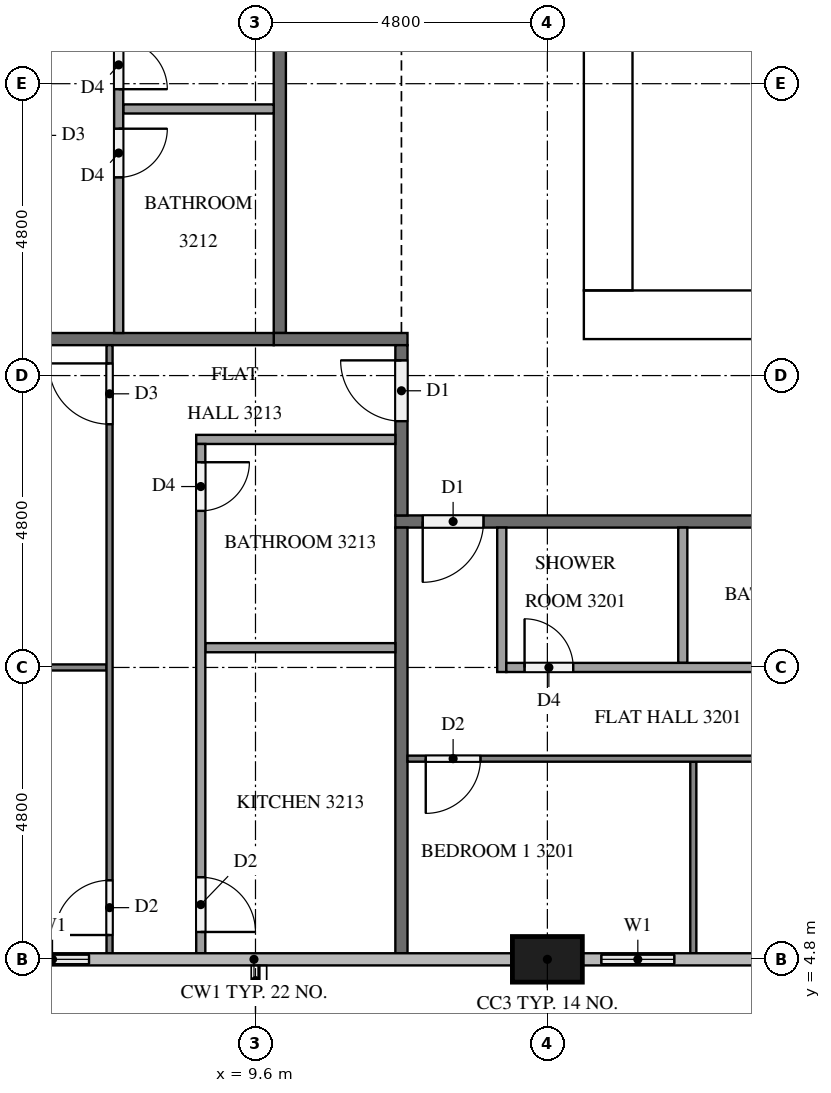
"""IFC4 building model, lengths in metres.
Left out: names, types, materials, properties, quantities, classifications, styles, units other than length and angle.
Written with IfcOpenShell. Run it as: python <this file> out.ifc"""

import sys

from ifc_helpers import new_model, si_unit, direction, frame, frame_2d, origin, origin_2d, place, context, subcontext, project, spatial, rectangle, extrude, element, fill, save


model = new_model("IFC4")
c1 = context("Model", 3, precision=1e-05, world=origin(), true_north=direction((0.0, 1.0)))
c2 = subcontext(c1, "Body", "Model", "MODEL_VIEW")
j1 = project(units=[si_unit("LENGTHUNIT", "METRE"), si_unit("PLANEANGLEUNIT", "RADIAN")], contexts=[c1])
p1 = place(None, origin())
s1 = spatial("IfcSite", under=j1, at=p1, CompositionType="ELEMENT")
p2 = place(p1, origin())
s2 = spatial("IfcBuilding", under=s1, at=p2, CompositionType="ELEMENT")
p3 = place(p2, frame((0.0, 0.0, 126.1)))
s3 = spatial("IfcBuildingStorey", under=s2, at=p3, CompositionType="ELEMENT", Elevation=126.1)
p4 = place(p3, frame((15.0, 15.4, 0.0), z_axis=(0.0, 0.0, 1.0), x_axis=(1.0, 0.0, 0.0)))
e1 = element("IfcWall", 1, at=p4, inside=s3, PredefinedType="SHEAR", context=c2, shape_type="SweptSolid", body=[
    extrude(rectangle(XDim=32.4, YDim=0.8, at=frame_2d((16.2, 0.0))), origin(), (0.0, 0.0, 1.0), 3.2),
])
p5 = place(p4, frame((15.3, 0.0, 0.0)))
e2 = element("IfcOpeningElement", 2, at=p5, cuts=e1, PredefinedType="OPENING", context=c2, shape_type="SweptSolid", body=[
    extrude(rectangle(XDim=1.8, YDim=2.1, at=frame_2d((0.9, 1.05))), frame((0.0, 0.41, 0.0), z_axis=(0.0, -1.0, 0.0), x_axis=(1.0, 0.0, 0.0)), (0.0, 0.0, 1.0), 0.82),
])
p6 = place(p3, frame((15.4, 15.8, 0.0), z_axis=(0.0, 0.0, 1.0), x_axis=(0.0, 1.0, 0.0)))
e3 = element("IfcWall", 3, at=p6, inside=s3, PredefinedType="SHEAR", context=c2, shape_type="SweptSolid", body=[
    extrude(rectangle(XDim=21.2, YDim=0.8, at=frame_2d((10.6, 0.0))), origin(), (0.0, 0.0, 1.0), 3.2),
])
p7 = place(p6, frame((4.96, 0.0, 0.0)))
e4 = element("IfcOpeningElement", 4, at=p7, cuts=e3, PredefinedType="OPENING", context=c2, shape_type="SweptSolid", body=[
    extrude(rectangle(XDim=1.2, YDim=2.1, at=frame_2d((0.6, 1.05))), frame((0.0, 0.41, 0.0), z_axis=(0.0, -1.0, 0.0), x_axis=(1.0, 0.0, 0.0)), (0.0, 0.0, 1.0), 0.82),
])
p8 = place(p3, frame((14.4, 4.8, 0.0), z_axis=(0.0, 0.0, 1.0), x_axis=(1.0, 0.0, 0.0)))
e5 = element("IfcColumn", 5, at=p8, inside=s3, PredefinedType="COLUMN", context=c2, shape_type="SweptSolid", body=[
    extrude(rectangle(XDim=1.15, YDim=0.75, at=origin_2d()), origin(), (0.0, 0.0, 1.0), 3.2),
])
p9 = place(p3, frame((5.325, 4.8, 0.0), z_axis=(0.0, 0.0, 1.0), x_axis=(1.0, 0.0, 0.0)))
e6 = element("IfcWall", 6, at=p9, inside=s3, PredefinedType="SOLIDWALL", context=c2, shape_type="SweptSolid", body=[
    extrude(rectangle(XDim=1.875, YDim=0.15, at=frame_2d((0.938, 0.0))), origin(), (0.0, 0.0, 1.0), 3.2),
])
p10 = place(p9, frame((0.337, 0.0, 0.9)))
e7 = element("IfcOpeningElement", 7, at=p10, cuts=e6, PredefinedType="OPENING", context=c2, shape_type="SweptSolid", body=[
    extrude(rectangle(XDim=1.2, YDim=1.4, at=frame_2d((0.6, 0.7))), frame((0.0, 0.085, 0.0), z_axis=(0.0, -1.0, 0.0), x_axis=(1.0, 0.0, 0.0)), (0.0, 0.0, 1.0), 0.17),
])
p11 = place(p3, frame((14.975, 4.8, 0.0), z_axis=(0.0, 0.0, 1.0), x_axis=(1.0, 0.0, 0.0)))
e8 = element("IfcWall", 8, at=p11, inside=s3, PredefinedType="SOLIDWALL", context=c2, shape_type="SweptSolid", body=[
    extrude(rectangle(XDim=1.825, YDim=0.15, at=frame_2d((0.913, 0.0))), origin(), (0.0, 0.0, 1.0), 3.2),
])
p12 = place(p11, frame((0.312, 0.0, 0.9)))
e9 = element("IfcOpeningElement", 9, at=p12, cuts=e8, PredefinedType="OPENING", context=c2, shape_type="SweptSolid", body=[
    extrude(rectangle(XDim=1.2, YDim=1.4, at=frame_2d((0.6, 0.7))), frame((0.0, 0.085, 0.0), z_axis=(0.0, -1.0, 0.0), x_axis=(1.0, 0.0, 0.0)), (0.0, 0.0, 1.0), 0.17),
])
p13 = place(p3, frame((50.5, 12.0, 0.0), z_axis=(0.0, 0.0, 1.0), x_axis=(-1.0, 0.0, 0.0)))
e10 = element("IfcWall", 10, at=p13, inside=s3, PredefinedType="PARTITIONING", context=c2, shape_type="SweptSolid", body=[
    extrude(rectangle(XDim=38.6, YDim=0.2, at=frame_2d((19.3, 0.0))), origin(), (0.0, 0.0, 1.0), 3.2),
])
p14 = place(p13, frame((37.15, 0.0, 0.0)))
e11 = element("IfcOpeningElement", 11, at=p14, cuts=e10, PredefinedType="OPENING", context=c2, shape_type="SweptSolid", body=[
    extrude(rectangle(XDim=1.0, YDim=2.1, at=frame_2d((0.5, 1.05))), frame((0.0, 0.11, 0.0), z_axis=(0.0, -1.0, 0.0), x_axis=(1.0, 0.0, 0.0)), (0.0, 0.0, 1.0), 0.22),
])
p15 = place(p13, frame((7.65, 0.0, 0.0)))
e12 = element("IfcOpeningElement", 12, at=p15, cuts=e10, PredefinedType="OPENING", context=c2, shape_type="SweptSolid", body=[
    extrude(rectangle(XDim=1.0, YDim=2.1, at=frame_2d((0.5, 1.05))), frame((0.0, 0.11, 0.0), z_axis=(0.0, -1.0, 0.0), x_axis=(1.0, 0.0, 0.0)), (0.0, 0.0, 1.0), 0.22),
])
p16 = place(p13, frame((5.95, 0.0, 0.0)))
e13 = element("IfcOpeningElement", 13, at=p16, cuts=e10, PredefinedType="OPENING", context=c2, shape_type="SweptSolid", body=[
    extrude(rectangle(XDim=1.0, YDim=2.1, at=frame_2d((0.5, 1.05))), frame((0.0, 0.11, 0.0), z_axis=(0.0, -1.0, 0.0), x_axis=(1.0, 0.0, 0.0)), (0.0, 0.0, 1.0), 0.22),
])
p17 = place(p3, frame((10.0, 15.1, 0.0), z_axis=(0.0, 0.0, 1.0), x_axis=(0.0, 1.0, 0.0)))
e14 = element("IfcWall", 14, at=p17, inside=s3, PredefinedType="PARTITIONING", context=c2, shape_type="SweptSolid", body=[
    extrude(rectangle(XDim=22.6, YDim=0.2, at=frame_2d((11.3, 0.0))), origin(), (0.0, 0.0, 1.0), 3.2),
])
p18 = place(p17, frame((21.35, 0.0, 0.0)))
e15 = element("IfcOpeningElement", 15, at=p18, cuts=e14, PredefinedType="OPENING", context=c2, shape_type="SweptSolid", body=[
    extrude(rectangle(XDim=1.0, YDim=2.1, at=frame_2d((0.5, 1.05))), frame((0.0, 0.11, 0.0), z_axis=(0.0, -1.0, 0.0), x_axis=(1.0, 0.0, 0.0)), (0.0, 0.0, 1.0), 0.22),
])
p19 = place(p17, frame((12.35, 0.0, 0.0)))
e16 = element("IfcOpeningElement", 16, at=p19, cuts=e14, PredefinedType="OPENING", context=c2, shape_type="SweptSolid", body=[
    extrude(rectangle(XDim=1.0, YDim=2.1, at=frame_2d((0.5, 1.05))), frame((0.0, 0.11, 0.0), z_axis=(0.0, -1.0, 0.0), x_axis=(1.0, 0.0, 0.0)), (0.0, 0.0, 1.0), 0.22),
])
p20 = place(p3, frame((9.9, 15.0, 0.0), z_axis=(0.0, 0.0, 1.0), x_axis=(1.0, 0.0, 0.0)))
e17 = element("IfcWall", 17, at=p20, inside=s3, PredefinedType="PARTITIONING", context=c2, shape_type="SweptSolid", body=[
    extrude(rectangle(XDim=2.2, YDim=0.2, at=frame_2d((1.1, 0.0))), origin(), (0.0, 0.0, 1.0), 3.2),
])
p21 = place(p3, frame((12.0, 12.1, 0.0), z_axis=(0.0, 0.0, 1.0), x_axis=(0.0, 1.0, 0.0)))
e18 = element("IfcWall", 18, at=p21, inside=s3, PredefinedType="PARTITIONING", context=c2, shape_type="SweptSolid", body=[
    extrude(rectangle(XDim=2.8, YDim=0.2, at=frame_2d((1.4, 0.0))), origin(), (0.0, 0.0, 1.0), 3.2),
])
p22 = place(p21, frame((1.55, 0.0, 0.0)))
e19 = element("IfcOpeningElement", 19, at=p22, cuts=e18, PredefinedType="OPENING", context=c2, shape_type="SweptSolid", body=[
    extrude(rectangle(XDim=1.0, YDim=2.1, at=frame_2d((0.5, 1.05))), frame((0.0, 0.11, 0.0), z_axis=(0.0, -1.0, 0.0), x_axis=(1.0, 0.0, 0.0)), (0.0, 0.0, 1.0), 0.22),
])
p23 = place(p3, frame((12.0, 4.9, 0.0), z_axis=(0.0, 0.0, 1.0), x_axis=(0.0, 1.0, 0.0)))
e20 = element("IfcWall", 20, at=p23, inside=s3, PredefinedType="PARTITIONING", context=c2, shape_type="SweptSolid", body=[
    extrude(rectangle(XDim=7.0, YDim=0.2, at=frame_2d((3.5, 0.0))), origin(), (0.0, 0.0, 1.0), 3.2),
])
p24 = place(p3, frame((0.1, 15.0, 0.0), z_axis=(0.0, 0.0, 1.0), x_axis=(1.0, 0.0, 0.0)))
e21 = element("IfcWall", 21, at=p24, inside=s3, PredefinedType="PARTITIONING", context=c2, shape_type="SweptSolid", body=[
    extrude(rectangle(XDim=9.8, YDim=0.2, at=frame_2d((4.9, 0.0))), origin(), (0.0, 0.0, 1.0), 3.2),
])
p25 = place(p3, frame((16.8, 8.05, 0.0), z_axis=(0.0, 0.0, 1.0), x_axis=(0.0, -1.0, 0.0)))
e22 = element("IfcWall", 22, at=p25, inside=s3, PredefinedType="PARTITIONING", context=c2, shape_type="SweptSolid", body=[
    extrude(rectangle(XDim=3.15, YDim=0.1, at=frame_2d((1.575, 0.0))), origin(), (0.0, 0.0, 1.0), 3.2),
])
p26 = place(p3, frame((26.3, 8.1, 0.0), z_axis=(0.0, 0.0, 1.0), x_axis=(-1.0, 0.0, 0.0)))
e23 = element("IfcWall", 23, at=p26, inside=s3, PredefinedType="PARTITIONING", context=c2, shape_type="SweptSolid", body=[
    extrude(rectangle(XDim=14.2, YDim=0.1, at=frame_2d((7.1, 0.0))), origin(), (0.0, 0.0, 1.0), 3.2),
])
p27 = place(p26, frame((13.0, 0.0, 0.0)))
e24 = element("IfcOpeningElement", 24, at=p27, cuts=e23, PredefinedType="OPENING", context=c2, shape_type="SweptSolid", body=[
    extrude(rectangle(XDim=0.9, YDim=2.1, at=frame_2d((0.45, 1.05))), frame((0.0, 0.06, 0.0), z_axis=(0.0, -1.0, 0.0), x_axis=(1.0, 0.0, 0.0)), (0.0, 0.0, 1.0), 0.12),
])
p28 = place(p26, frame((5.05, 0.0, 0.0)))
e25 = element("IfcOpeningElement", 25, at=p28, cuts=e23, PredefinedType="OPENING", context=c2, shape_type="SweptSolid", body=[
    extrude(rectangle(XDim=0.9, YDim=2.1, at=frame_2d((0.45, 1.05))), frame((0.0, 0.06, 0.0), z_axis=(0.0, -1.0, 0.0), x_axis=(1.0, 0.0, 0.0)), (0.0, 0.0, 1.0), 0.12),
])
p29 = place(p26, frame((3.35, 0.0, 0.0)))
e26 = element("IfcOpeningElement", 26, at=p29, cuts=e23, PredefinedType="OPENING", context=c2, shape_type="SweptSolid", body=[
    extrude(rectangle(XDim=1.0, YDim=2.1, at=frame_2d((0.5, 1.05))), frame((0.0, 0.06, 0.0), z_axis=(0.0, -1.0, 0.0), x_axis=(1.0, 0.0, 0.0)), (0.0, 0.0, 1.0), 0.12),
])
p30 = place(p3, frame((16.627, 11.9, 0.0), z_axis=(0.0, 0.0, 1.0), x_axis=(0.0, -1.0, 0.0)))
e27 = element("IfcWall", 27, at=p30, inside=s3, PredefinedType="PARTITIONING", context=c2, shape_type="SweptSolid", body=[
    extrude(rectangle(XDim=2.225, YDim=0.15, at=frame_2d((1.112, 0.0))), origin(), (0.0, 0.0, 1.0), 3.2),
])
p31 = place(p3, frame((13.65, 11.9, 0.0), z_axis=(0.0, 0.0, 1.0), x_axis=(0.0, -1.0, 0.0)))
e28 = element("IfcWall", 28, at=p31, inside=s3, PredefinedType="PARTITIONING", context=c2, shape_type="SweptSolid", body=[
    extrude(rectangle(XDim=2.375, YDim=0.15, at=frame_2d((1.188, 0.0))), origin(), (0.0, 0.0, 1.0), 3.2),
])
p32 = place(p3, frame((13.725, 9.6, 0.0), z_axis=(0.0, 0.0, 1.0), x_axis=(1.0, 0.0, 0.0)))
e29 = element("IfcWall", 29, at=p32, inside=s3, PredefinedType="PARTITIONING", context=c2, shape_type="SweptSolid", body=[
    extrude(rectangle(XDim=12.575, YDim=0.15, at=frame_2d((6.288, 0.0))), origin(), (0.0, 0.0, 1.0), 3.2),
])
p33 = place(p32, frame((0.3, 0.0, 0.0)))
e30 = element("IfcOpeningElement", 30, at=p33, cuts=e29, PredefinedType="OPENING", context=c2, shape_type="SweptSolid", body=[
    extrude(rectangle(XDim=0.8, YDim=2.1, at=frame_2d((0.4, 1.05))), frame((0.0, 0.085, 0.0), z_axis=(0.0, -1.0, 0.0), x_axis=(1.0, 0.0, 0.0)), (0.0, 0.0, 1.0), 0.17),
])
p34 = place(p32, frame((5.546, 0.0, 0.0)))
e31 = element("IfcOpeningElement", 31, at=p34, cuts=e29, PredefinedType="OPENING", context=c2, shape_type="SweptSolid", body=[
    extrude(rectangle(XDim=0.9, YDim=2.1, at=frame_2d((0.45, 1.05))), frame((0.0, 0.085, 0.0), z_axis=(0.0, -1.0, 0.0), x_axis=(1.0, 0.0, 0.0)), (0.0, 0.0, 1.0), 0.17),
])
p35 = place(p32, frame((7.096, 0.0, 0.0)))
e32 = element("IfcOpeningElement", 32, at=p35, cuts=e29, PredefinedType="OPENING", context=c2, shape_type="SweptSolid", body=[
    extrude(rectangle(XDim=0.9, YDim=2.1, at=frame_2d((0.45, 1.05))), frame((0.0, 0.085, 0.0), z_axis=(0.0, -1.0, 0.0), x_axis=(1.0, 0.0, 0.0)), (0.0, 0.0, 1.0), 0.17),
])
p36 = place(p3, frame((9.9, 18.785, 0.0), z_axis=(0.0, 0.0, 1.0), x_axis=(-1.0, 0.0, 0.0)))
e33 = element("IfcWall", 33, at=p36, inside=s3, PredefinedType="PARTITIONING", context=c2, shape_type="SweptSolid", body=[
    extrude(rectangle(XDim=2.475, YDim=0.15, at=frame_2d((1.237, 0.0))), origin(), (0.0, 0.0, 1.0), 3.2),
])
p37 = place(p3, frame((7.35, 27.075, 0.0), z_axis=(0.0, 0.0, 1.0), x_axis=(0.0, -1.0, 0.0)))
e34 = element("IfcWall", 34, at=p37, inside=s3, PredefinedType="PARTITIONING", context=c2, shape_type="SweptSolid", body=[
    extrude(rectangle(XDim=11.975, YDim=0.15, at=frame_2d((5.987, 0.0))), origin(), (0.0, 0.0, 1.0), 3.2),
])
p38 = place(p37, frame((0.3, 0.0, 0.0)))
e35 = element("IfcOpeningElement", 35, at=p38, cuts=e34, PredefinedType="OPENING", context=c2, shape_type="SweptSolid", body=[
    extrude(rectangle(XDim=0.9, YDim=2.1, at=frame_2d((0.45, 1.05))), frame((0.0, 0.085, 0.0), z_axis=(0.0, -1.0, 0.0), x_axis=(1.0, 0.0, 0.0)), (0.0, 0.0, 1.0), 0.17),
])
p39 = place(p37, frame((7.165, 0.0, 0.0)))
e36 = element("IfcOpeningElement", 36, at=p39, cuts=e34, PredefinedType="OPENING", context=c2, shape_type="SweptSolid", body=[
    extrude(rectangle(XDim=0.8, YDim=2.1, at=frame_2d((0.4, 1.05))), frame((0.0, 0.085, 0.0), z_axis=(0.0, -1.0, 0.0), x_axis=(1.0, 0.0, 0.0)), (0.0, 0.0, 1.0), 0.17),
])
p40 = place(p37, frame((8.615, 0.0, 0.0)))
e37 = element("IfcOpeningElement", 37, at=p40, cuts=e34, PredefinedType="OPENING", context=c2, shape_type="SweptSolid", body=[
    extrude(rectangle(XDim=0.8, YDim=2.1, at=frame_2d((0.4, 1.05))), frame((0.0, 0.085, 0.0), z_axis=(0.0, -1.0, 0.0), x_axis=(1.0, 0.0, 0.0)), (0.0, 0.0, 1.0), 0.17),
])
p41 = place(p3, frame((7.15, 9.6, 0.0), z_axis=(0.0, 0.0, 1.0), x_axis=(-1.0, 0.0, 0.0)))
e38 = element("IfcWall", 38, at=p41, inside=s3, PredefinedType="PARTITIONING", context=c2, shape_type="SweptSolid", body=[
    extrude(rectangle(XDim=6.625, YDim=0.1, at=frame_2d((3.312, 0.0))), origin(), (0.0, 0.0, 1.0), 3.2),
])
p42 = place(p3, frame((7.2, 4.9, 0.0), z_axis=(0.0, 0.0, 1.0), x_axis=(0.0, 1.0, 0.0)))
e39 = element("IfcWall", 39, at=p42, inside=s3, PredefinedType="PARTITIONING", context=c2, shape_type="SweptSolid", body=[
    extrude(rectangle(XDim=10.0, YDim=0.1, at=frame_2d((5.0, 0.0))), origin(), (0.0, 0.0, 1.0), 3.2),
])
p43 = place(p42, frame((8.7, 0.0, 0.0)))
e40 = element("IfcOpeningElement", 40, at=p43, cuts=e39, PredefinedType="OPENING", context=c2, shape_type="SweptSolid", body=[
    extrude(rectangle(XDim=1.0, YDim=2.1, at=frame_2d((0.5, 1.05))), frame((0.0, 0.06, 0.0), z_axis=(0.0, -1.0, 0.0), x_axis=(1.0, 0.0, 0.0)), (0.0, 0.0, 1.0), 0.12),
])
p44 = place(p42, frame((0.3, 0.0, 0.0)))
e41 = element("IfcOpeningElement", 41, at=p44, cuts=e39, PredefinedType="OPENING", context=c2, shape_type="SweptSolid", body=[
    extrude(rectangle(XDim=0.9, YDim=2.1, at=frame_2d((0.45, 1.05))), frame((0.0, 0.06, 0.0), z_axis=(0.0, -1.0, 0.0), x_axis=(1.0, 0.0, 0.0)), (0.0, 0.0, 1.0), 0.12),
])
p45 = place(p3, frame((11.9, 9.925, 0.0), z_axis=(0.0, 0.0, 1.0), x_axis=(-1.0, 0.0, 0.0)))
e42 = element("IfcWall", 42, at=p45, inside=s3, PredefinedType="PARTITIONING", context=c2, shape_type="SweptSolid", body=[
    extrude(rectangle(XDim=3.125, YDim=0.15, at=frame_2d((1.562, 0.0))), origin(), (0.0, 0.0, 1.0), 3.2),
])
p46 = place(p3, frame((11.9, 13.35, 0.0), z_axis=(0.0, 0.0, 1.0), x_axis=(-1.0, 0.0, 0.0)))
e43 = element("IfcWall", 43, at=p46, inside=s3, PredefinedType="PARTITIONING", context=c2, shape_type="SweptSolid", body=[
    extrude(rectangle(XDim=3.275, YDim=0.15, at=frame_2d((1.637, 0.0))), origin(), (0.0, 0.0, 1.0), 3.2),
])
p47 = place(p3, frame((8.7, 13.275, 0.0), z_axis=(0.0, 0.0, 1.0), x_axis=(0.0, -1.0, 0.0)))
e44 = element("IfcWall", 44, at=p47, inside=s3, PredefinedType="PARTITIONING", context=c2, shape_type="SweptSolid", body=[
    extrude(rectangle(XDim=8.375, YDim=0.15, at=frame_2d((4.188, 0.0))), origin(), (0.0, 0.0, 1.0), 3.2),
])
p48 = place(p47, frame((0.3, 0.0, 0.0)))
e45 = element("IfcOpeningElement", 45, at=p48, cuts=e44, PredefinedType="OPENING", context=c2, shape_type="SweptSolid", body=[
    extrude(rectangle(XDim=0.8, YDim=2.1, at=frame_2d((0.4, 1.05))), frame((0.0, 0.085, 0.0), z_axis=(0.0, -1.0, 0.0), x_axis=(1.0, 0.0, 0.0)), (0.0, 0.0, 1.0), 0.17),
])
p49 = place(p47, frame((7.125, 0.0, 0.0)))
e46 = element("IfcOpeningElement", 46, at=p49, cuts=e44, PredefinedType="OPENING", context=c2, shape_type="SweptSolid", body=[
    extrude(rectangle(XDim=0.9, YDim=2.1, at=frame_2d((0.45, 1.05))), frame((0.0, 0.085, 0.0), z_axis=(0.0, -1.0, 0.0), x_axis=(1.0, 0.0, 0.0)), (0.0, 0.0, 1.0), 0.17),
])
p50 = place(p10, origin())
e47 = element("IfcWindow", 47, at=p50, inside=s3, PartitioningType="SINGLE_PANEL", PredefinedType="WINDOW", context=c2, shape_type="SweptSolid", body=[
    extrude(rectangle(XDim=1.2, YDim=1.4, at=frame_2d((0.6, 0.7))), frame((0.0, 0.03, 0.0), z_axis=(0.0, -1.0, 0.0), x_axis=(1.0, 0.0, 0.0)), (0.0, 0.0, 1.0), 0.06),
])
fill(e7, e47)
p51 = place(p12, origin())
e48 = element("IfcWindow", 48, at=p51, inside=s3, PartitioningType="SINGLE_PANEL", PredefinedType="WINDOW", context=c2, shape_type="SweptSolid", body=[
    extrude(rectangle(XDim=1.2, YDim=1.4, at=frame_2d((0.6, 0.7))), frame((0.0, 0.03, 0.0), z_axis=(0.0, -1.0, 0.0), x_axis=(1.0, 0.0, 0.0)), (0.0, 0.0, 1.0), 0.06),
])
fill(e9, e48)
p52 = place(p14, origin())
e49 = element("IfcDoor", 49, at=p52, inside=s3, OperationType="SINGLE_SWING_RIGHT", PredefinedType="DOOR", context=c2, shape_type="SweptSolid", body=[
    extrude(rectangle(XDim=1.0, YDim=2.1, at=frame_2d((0.5, 1.05))), frame((0.0, 0.025, 0.0), z_axis=(0.0, -1.0, 0.0), x_axis=(1.0, 0.0, 0.0)), (0.0, 0.0, 1.0), 0.05),
])
fill(e11, e49)
p53 = place(p22, origin())
e50 = element("IfcDoor", 50, at=p53, inside=s3, OperationType="SINGLE_SWING_RIGHT", PredefinedType="DOOR", context=c2, shape_type="SweptSolid", body=[
    extrude(rectangle(XDim=1.0, YDim=2.1, at=frame_2d((0.5, 1.05))), frame((0.0, 0.025, 0.0), z_axis=(0.0, -1.0, 0.0), x_axis=(1.0, 0.0, 0.0)), (0.0, 0.0, 1.0), 0.05),
])
fill(e19, e50)
p54 = place(p27, origin())
e51 = element("IfcDoor", 51, at=p54, inside=s3, OperationType="SINGLE_SWING_RIGHT", PredefinedType="DOOR", context=c2, shape_type="SweptSolid", body=[
    extrude(rectangle(XDim=0.9, YDim=2.1, at=frame_2d((0.45, 1.05))), frame((0.0, 0.025, 0.0), z_axis=(0.0, -1.0, 0.0), x_axis=(1.0, 0.0, 0.0)), (0.0, 0.0, 1.0), 0.05),
])
fill(e24, e51)
p55 = place(p33, origin())
e52 = element("IfcDoor", 52, at=p55, inside=s3, OperationType="SINGLE_SWING_LEFT", PredefinedType="DOOR", context=c2, shape_type="SweptSolid", body=[
    extrude(rectangle(XDim=0.8, YDim=2.1, at=frame_2d((0.4, 1.05))), frame((0.0, 0.025, 0.0), z_axis=(0.0, -1.0, 0.0), x_axis=(1.0, 0.0, 0.0)), (0.0, 0.0, 1.0), 0.05),
])
fill(e30, e52)
p56 = place(p39, origin())
e53 = element("IfcDoor", 53, at=p56, inside=s3, OperationType="SINGLE_SWING_RIGHT", PredefinedType="DOOR", context=c2, shape_type="SweptSolid", body=[
    extrude(rectangle(XDim=0.8, YDim=2.1, at=frame_2d((0.4, 1.05))), frame((0.0, 0.025, 0.0), z_axis=(0.0, -1.0, 0.0), x_axis=(1.0, 0.0, 0.0)), (0.0, 0.0, 1.0), 0.05),
])
fill(e36, e53)
p57 = place(p40, origin())
e54 = element("IfcDoor", 54, at=p57, inside=s3, OperationType="SINGLE_SWING_LEFT", PredefinedType="DOOR", context=c2, shape_type="SweptSolid", body=[
    extrude(rectangle(XDim=0.8, YDim=2.1, at=frame_2d((0.4, 1.05))), frame((0.0, 0.025, 0.0), z_axis=(0.0, -1.0, 0.0), x_axis=(1.0, 0.0, 0.0)), (0.0, 0.0, 1.0), 0.05),
])
fill(e37, e54)
p58 = place(p43, origin())
e55 = element("IfcDoor", 55, at=p58, inside=s3, OperationType="SINGLE_SWING_RIGHT", PredefinedType="DOOR", context=c2, shape_type="SweptSolid", body=[
    extrude(rectangle(XDim=1.0, YDim=2.1, at=frame_2d((0.5, 1.05))), frame((0.0, 0.025, 0.0), z_axis=(0.0, -1.0, 0.0), x_axis=(1.0, 0.0, 0.0)), (0.0, 0.0, 1.0), 0.05),
])
fill(e40, e55)
p59 = place(p44, origin())
e56 = element("IfcDoor", 56, at=p59, inside=s3, OperationType="SINGLE_SWING_LEFT", PredefinedType="DOOR", context=c2, shape_type="SweptSolid", body=[
    extrude(rectangle(XDim=0.9, YDim=2.1, at=frame_2d((0.45, 1.05))), frame((0.0, 0.025, 0.0), z_axis=(0.0, -1.0, 0.0), x_axis=(1.0, 0.0, 0.0)), (0.0, 0.0, 1.0), 0.05),
])
fill(e41, e56)
p60 = place(p48, origin())
e57 = element("IfcDoor", 57, at=p60, inside=s3, OperationType="SINGLE_SWING_LEFT", PredefinedType="DOOR", context=c2, shape_type="SweptSolid", body=[
    extrude(rectangle(XDim=0.8, YDim=2.1, at=frame_2d((0.4, 1.05))), frame((0.0, 0.025, 0.0), z_axis=(0.0, -1.0, 0.0), x_axis=(1.0, 0.0, 0.0)), (0.0, 0.0, 1.0), 0.05),
])
fill(e45, e57)
p61 = place(p49, origin())
e58 = element("IfcDoor", 58, at=p61, inside=s3, OperationType="SINGLE_SWING_RIGHT", PredefinedType="DOOR", context=c2, shape_type="SweptSolid", body=[
    extrude(rectangle(XDim=0.9, YDim=2.1, at=frame_2d((0.45, 1.05))), frame((0.0, 0.025, 0.0), z_axis=(0.0, -1.0, 0.0), x_axis=(1.0, 0.0, 0.0)), (0.0, 0.0, 1.0), 0.05),
])
fill(e46, e58)
save(model, sys.argv[1])
